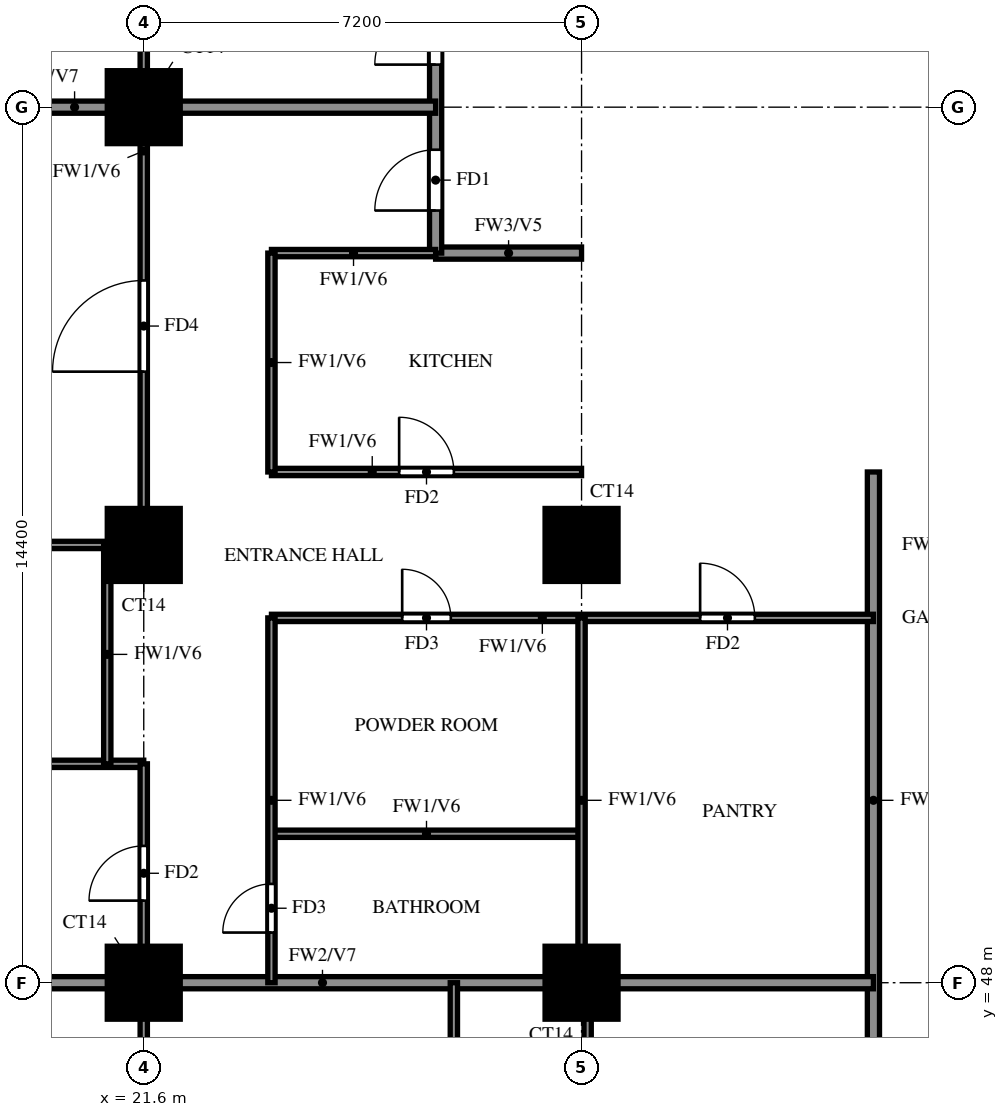
"""IFC4 building model, lengths in metres.
Left out: names, types, materials, properties, quantities, classifications, styles, units other than length and angle.
Written with IfcOpenShell. Run it as: python <this file> out.ifc"""

import sys

from ifc_helpers import new_model, si_unit, direction, frame, frame_2d, origin, origin_2d, place, context, subcontext, project, spatial, rectangle, extrude, source, transform, mapped, element, fill, save


model = new_model("IFC4")
c1 = context("Model", 3, precision=1e-05, world=origin(), true_north=direction((0.0, 1.0)))
c2 = subcontext(c1, "Body", "Model", "MODEL_VIEW")
j1 = project(units=[si_unit("LENGTHUNIT", "METRE"), si_unit("PLANEANGLEUNIT", "RADIAN")], contexts=[c1])
p1 = place(None, origin())
s1 = spatial("IfcSite", under=j1, at=p1, CompositionType="ELEMENT")
p2 = place(p1, origin())
s2 = spatial("IfcBuilding", under=s1, at=p2, CompositionType="ELEMENT")
p3 = place(p2, frame((0.0, 0.0, 104.0)))
s3 = spatial("IfcBuildingStorey", under=s2, at=p3, CompositionType="ELEMENT", Elevation=104.0)
m1 = source(origin(), c2, "Body", "SweptSolid", [
    extrude(rectangle(XDim=1.2, YDim=1.2, at=origin_2d()), origin(), (0.0, 0.0, 1.0), 3.1),
])
for number, where, z_axis, x_axis in (
    (1, (21.6, 48.0, 0.0), (0.0, 0.0, 1.0), (1.0, 0.0, 0.0)),
    (2, (28.8, 48.0, 0.0), (0.0, 0.0, 1.0), (1.0, 0.0, 0.0)),
    (3, (21.6, 55.2, 0.0), (0.0, 0.0, 1.0), (1.0, 0.0, 0.0)),
    (4, (28.8, 55.2, 0.0), (0.0, 0.0, 1.0), (1.0, 0.0, 0.0)),
    (5, (21.6, 62.4, 0.0), (0.0, 0.0, 1.0), (1.0, 0.0, 0.0)),
):
    element("IfcColumn", number, at=place(p3, frame(where, z_axis=z_axis, x_axis=x_axis)), inside=s3, PredefinedType="COLUMN", context=c2, shape_type="MappedRepresentation", body=[
        mapped(m1, transform((0.0, 0.0, 0.0))),
    ])
p4 = place(p3, frame((26.4, 60.0, 0.0), z_axis=(0.0, 0.0, 1.0), x_axis=(1.0, 0.0, 0.0)))
e6 = element("IfcWall", 6, at=p4, inside=s3, PredefinedType="SOLIDWALL", context=c2, shape_type="SweptSolid", body=[
    extrude(rectangle(XDim=2.4, YDim=0.2, at=frame_2d((1.2, 0.0))), origin(), (0.0, 0.0, 1.0), 3.1),
])
p5 = place(p3, frame((26.4, 60.0, 0.0), z_axis=(0.0, 0.0, 1.0), x_axis=(0.0, 1.0, 0.0)))
e7 = element("IfcWall", 7, at=p5, inside=s3, PredefinedType="SOLIDWALL", context=c2, shape_type="SweptSolid", body=[
    extrude(rectangle(XDim=9.6, YDim=0.2, at=frame_2d((4.8, 0.0))), origin(), (0.0, 0.0, 1.0), 3.1),
])
p6 = place(p5, frame((0.7, 0.0, 0.0)))
e8 = element("IfcOpeningElement", 8, at=p6, cuts=e7, PredefinedType="OPENING", context=c2, shape_type="SweptSolid", body=[
    extrude(rectangle(XDim=1.0, YDim=2.1, at=frame_2d((0.5, 1.05))), frame((0.0, 0.11, 0.0), z_axis=(0.0, -1.0, 0.0), x_axis=(1.0, 0.0, 0.0)), (0.0, 0.0, 1.0), 0.22),
])
p7 = place(p5, frame((3.1, 0.0, 0.0)))
e9 = element("IfcOpeningElement", 9, at=p7, cuts=e7, PredefinedType="OPENING", context=c2, shape_type="SweptSolid", body=[
    extrude(rectangle(XDim=1.0, YDim=2.1, at=frame_2d((0.5, 1.05))), frame((0.0, 0.11, 0.0), z_axis=(0.0, -1.0, 0.0), x_axis=(1.0, 0.0, 0.0)), (0.0, 0.0, 1.0), 0.22),
])
p8 = place(p3, frame((33.6, 45.6, 0.0), z_axis=(0.0, 0.0, 1.0), x_axis=(0.0, 1.0, 0.0)))
e10 = element("IfcWall", 10, at=p8, inside=s3, PredefinedType="SOLIDWALL", context=c2, shape_type="SweptSolid", body=[
    extrude(rectangle(XDim=10.8, YDim=0.2, at=frame_2d((5.4, 0.0))), origin(), (0.0, 0.0, 1.0), 3.1),
])
p9 = place(p3, frame((14.525, 48.0, 0.0), z_axis=(0.0, 0.0, 1.0), x_axis=(1.0, 0.0, 0.0)))
e11 = element("IfcWall", 11, at=p9, inside=s3, PredefinedType="SOLIDWALL", context=c2, shape_type="SweptSolid", body=[
    extrude(rectangle(XDim=19.075, YDim=0.2, at=frame_2d((9.538, 0.0))), origin(), (0.0, 0.0, 1.0), 3.1),
])
p10 = place(p3, frame((14.525, 62.4, 0.0), z_axis=(0.0, 0.0, 1.0), x_axis=(1.0, 0.0, 0.0)))
e12 = element("IfcWall", 12, at=p10, inside=s3, PredefinedType="SOLIDWALL", context=c2, shape_type="SweptSolid", body=[
    extrude(rectangle(XDim=11.875, YDim=0.2, at=frame_2d((5.938, 0.0))), origin(), (0.0, 0.0, 1.0), 3.1),
])
p11 = place(p3, frame((23.7, 50.45, 0.0), z_axis=(0.0, 0.0, 1.0), x_axis=(1.0, 0.0, 0.0)))
e13 = element("IfcWall", 13, at=p11, inside=s3, PredefinedType="PARTITIONING", context=c2, shape_type="SweptSolid", body=[
    extrude(rectangle(XDim=5.1, YDim=0.12, at=frame_2d((2.55, 0.0))), origin(), (0.0, 0.0, 1.0), 3.1),
])
p12 = place(p3, frame((14.525, 51.6, 0.0), z_axis=(0.0, 0.0, 1.0), x_axis=(1.0, 0.0, 0.0)))
e14 = element("IfcWall", 14, at=p12, inside=s3, PredefinedType="PARTITIONING", context=c2, shape_type="SweptSolid", body=[
    extrude(rectangle(XDim=7.075, YDim=0.12, at=frame_2d((3.538, 0.0))), origin(), (0.0, 0.0, 1.0), 3.1),
])
p13 = place(p12, frame((2.837, 0.0, 0.0)))
e15 = element("IfcOpeningElement", 15, at=p13, cuts=e14, PredefinedType="OPENING", context=c2, shape_type="SweptSolid", body=[
    extrude(rectangle(XDim=0.8, YDim=2.1, at=frame_2d((0.4, 1.05))), frame((0.0, 0.07, 0.0), z_axis=(0.0, -1.0, 0.0), x_axis=(1.0, 0.0, 0.0)), (0.0, 0.0, 1.0), 0.14),
])
p14 = place(p3, frame((23.7, 54.0, 0.0), z_axis=(0.0, 0.0, 1.0), x_axis=(1.0, 0.0, 0.0)))
e16 = element("IfcWall", 16, at=p14, inside=s3, PredefinedType="PARTITIONING", context=c2, shape_type="SweptSolid", body=[
    extrude(rectangle(XDim=9.9, YDim=0.12, at=frame_2d((4.95, 0.0))), origin(), (0.0, 0.0, 1.0), 3.1),
])
p15 = place(p14, frame((2.15, 0.0, 0.0)))
e17 = element("IfcOpeningElement", 17, at=p15, cuts=e16, PredefinedType="OPENING", context=c2, shape_type="SweptSolid", body=[
    extrude(rectangle(XDim=0.8, YDim=2.1, at=frame_2d((0.4, 1.05))), frame((0.0, 0.07, 0.0), z_axis=(0.0, -1.0, 0.0), x_axis=(1.0, 0.0, 0.0)), (0.0, 0.0, 1.0), 0.14),
])
p16 = place(p14, frame((7.05, 0.0, 0.0)))
e18 = element("IfcOpeningElement", 18, at=p16, cuts=e16, PredefinedType="OPENING", context=c2, shape_type="SweptSolid", body=[
    extrude(rectangle(XDim=0.9, YDim=2.1, at=frame_2d((0.45, 1.05))), frame((0.0, 0.07, 0.0), z_axis=(0.0, -1.0, 0.0), x_axis=(1.0, 0.0, 0.0)), (0.0, 0.0, 1.0), 0.14),
])
p17 = place(p3, frame((14.525, 55.2, 0.0), z_axis=(0.0, 0.0, 1.0), x_axis=(1.0, 0.0, 0.0)))
e19 = element("IfcWall", 19, at=p17, inside=s3, PredefinedType="PARTITIONING", context=c2, shape_type="SweptSolid", body=[
    extrude(rectangle(XDim=7.075, YDim=0.12, at=frame_2d((3.538, 0.0))), origin(), (0.0, 0.0, 1.0), 3.1),
])
p18 = place(p3, frame((23.7, 56.4, 0.0), z_axis=(0.0, 0.0, 1.0), x_axis=(1.0, 0.0, 0.0)))
e20 = element("IfcWall", 20, at=p18, inside=s3, PredefinedType="PARTITIONING", context=c2, shape_type="SweptSolid", body=[
    extrude(rectangle(XDim=5.1, YDim=0.12, at=frame_2d((2.55, 0.0))), origin(), (0.0, 0.0, 1.0), 3.1),
])
p19 = place(p18, frame((2.1, 0.0, 0.0)))
e21 = element("IfcOpeningElement", 21, at=p19, cuts=e20, PredefinedType="OPENING", context=c2, shape_type="SweptSolid", body=[
    extrude(rectangle(XDim=0.9, YDim=2.1, at=frame_2d((0.45, 1.05))), frame((0.0, 0.07, 0.0), z_axis=(0.0, -1.0, 0.0), x_axis=(1.0, 0.0, 0.0)), (0.0, 0.0, 1.0), 0.14),
])
p20 = place(p3, frame((23.7, 60.0, 0.0), z_axis=(0.0, 0.0, 1.0), x_axis=(1.0, 0.0, 0.0)))
e22 = element("IfcWall", 22, at=p20, inside=s3, PredefinedType="PARTITIONING", context=c2, shape_type="SweptSolid", body=[
    extrude(rectangle(XDim=2.7, YDim=0.12, at=frame_2d((1.35, 0.0))), origin(), (0.0, 0.0, 1.0), 3.1),
])
p21 = place(p3, frame((21.0, 51.6, 0.0), z_axis=(0.0, 0.0, 1.0), x_axis=(0.0, 1.0, 0.0)))
e23 = element("IfcWall", 23, at=p21, inside=s3, PredefinedType="PARTITIONING", context=c2, shape_type="SweptSolid", body=[
    extrude(rectangle(XDim=3.6, YDim=0.12, at=frame_2d((1.8, 0.0))), origin(), (0.0, 0.0, 1.0), 3.1),
])
p22 = place(p3, frame((21.6, 33.725, 0.0), z_axis=(0.0, 0.0, 1.0), x_axis=(0.0, 1.0, 0.0)))
e24 = element("IfcWall", 24, at=p22, inside=s3, PredefinedType="PARTITIONING", context=c2, shape_type="SweptSolid", body=[
    extrude(rectangle(XDim=17.875, YDim=0.12, at=frame_2d((8.938, 0.0))), origin(), (0.0, 0.0, 1.0), 3.1),
])
p23 = place(p22, frame((7.775, 0.0, 0.0)))
e25 = element("IfcOpeningElement", 25, at=p23, cuts=e24, PredefinedType="OPENING", context=c2, shape_type="SweptSolid", body=[
    extrude(rectangle(XDim=0.9, YDim=2.1, at=frame_2d((0.45, 1.05))), frame((0.0, 0.07, 0.0), z_axis=(0.0, -1.0, 0.0), x_axis=(1.0, 0.0, 0.0)), (0.0, 0.0, 1.0), 0.14),
])
p24 = place(p22, frame((15.625, 0.0, 0.0)))
e26 = element("IfcOpeningElement", 26, at=p24, cuts=e24, PredefinedType="OPENING", context=c2, shape_type="SweptSolid", body=[
    extrude(rectangle(XDim=0.9, YDim=2.1, at=frame_2d((0.45, 1.05))), frame((0.0, 0.07, 0.0), z_axis=(0.0, -1.0, 0.0), x_axis=(1.0, 0.0, 0.0)), (0.0, 0.0, 1.0), 0.14),
])
p25 = place(p3, frame((21.6, 55.2, 0.0), z_axis=(0.0, 0.0, 1.0), x_axis=(0.0, 1.0, 0.0)))
e27 = element("IfcWall", 27, at=p25, inside=s3, PredefinedType="PARTITIONING", context=c2, shape_type="SweptSolid", body=[
    extrude(rectangle(XDim=14.4, YDim=0.12, at=frame_2d((7.2, 0.0))), origin(), (0.0, 0.0, 1.0), 3.1),
])
p26 = place(p25, frame((2.85, 0.0, 0.0)))
e28 = element("IfcOpeningElement", 28, at=p26, cuts=e27, PredefinedType="OPENING", context=c2, shape_type="SweptSolid", body=[
    extrude(rectangle(XDim=1.5, YDim=2.1, at=frame_2d((0.75, 1.05))), frame((0.0, 0.07, 0.0), z_axis=(0.0, -1.0, 0.0), x_axis=(1.0, 0.0, 0.0)), (0.0, 0.0, 1.0), 0.14),
])
p27 = place(p25, frame((8.55, 0.0, 0.0)))
e29 = element("IfcOpeningElement", 29, at=p27, cuts=e27, PredefinedType="OPENING", context=c2, shape_type="SweptSolid", body=[
    extrude(rectangle(XDim=0.9, YDim=2.1, at=frame_2d((0.45, 1.05))), frame((0.0, 0.07, 0.0), z_axis=(0.0, -1.0, 0.0), x_axis=(1.0, 0.0, 0.0)), (0.0, 0.0, 1.0), 0.14),
])
p28 = place(p25, frame((12.15, 0.0, 0.0)))
e30 = element("IfcOpeningElement", 30, at=p28, cuts=e27, PredefinedType="OPENING", context=c2, shape_type="SweptSolid", body=[
    extrude(rectangle(XDim=0.9, YDim=2.1, at=frame_2d((0.45, 1.05))), frame((0.0, 0.07, 0.0), z_axis=(0.0, -1.0, 0.0), x_axis=(1.0, 0.0, 0.0)), (0.0, 0.0, 1.0), 0.14),
])
p29 = place(p3, frame((23.7, 48.0, 0.0), z_axis=(0.0, 0.0, 1.0), x_axis=(0.0, 1.0, 0.0)))
e31 = element("IfcWall", 31, at=p29, inside=s3, PredefinedType="PARTITIONING", context=c2, shape_type="SweptSolid", body=[
    extrude(rectangle(XDim=6.0, YDim=0.12, at=frame_2d((3.0, 0.0))), origin(), (0.0, 0.0, 1.0), 3.1),
])
p30 = place(p29, frame((0.825, 0.0, 0.0)))
e32 = element("IfcOpeningElement", 32, at=p30, cuts=e31, PredefinedType="OPENING", context=c2, shape_type="SweptSolid", body=[
    extrude(rectangle(XDim=0.8, YDim=2.1, at=frame_2d((0.4, 1.05))), frame((0.0, 0.07, 0.0), z_axis=(0.0, -1.0, 0.0), x_axis=(1.0, 0.0, 0.0)), (0.0, 0.0, 1.0), 0.14),
])
p31 = place(p3, frame((23.7, 56.4, 0.0), z_axis=(0.0, 0.0, 1.0), x_axis=(0.0, 1.0, 0.0)))
e33 = element("IfcWall", 33, at=p31, inside=s3, PredefinedType="PARTITIONING", context=c2, shape_type="SweptSolid", body=[
    extrude(rectangle(XDim=3.6, YDim=0.12, at=frame_2d((1.8, 0.0))), origin(), (0.0, 0.0, 1.0), 3.1),
])
p32 = place(p3, frame((26.7, 42.9, 0.0), z_axis=(0.0, 0.0, 1.0), x_axis=(0.0, 1.0, 0.0)))
e34 = element("IfcWall", 34, at=p32, inside=s3, PredefinedType="PARTITIONING", context=c2, shape_type="SweptSolid", body=[
    extrude(rectangle(XDim=5.1, YDim=0.12, at=frame_2d((2.55, 0.0))), origin(), (0.0, 0.0, 1.0), 3.1),
])
p33 = place(p3, frame((28.8, 48.0, 0.0), z_axis=(0.0, 0.0, 1.0), x_axis=(0.0, 1.0, 0.0)))
e35 = element("IfcWall", 35, at=p33, inside=s3, PredefinedType="PARTITIONING", context=c2, shape_type="SweptSolid", body=[
    extrude(rectangle(XDim=6.0, YDim=0.12, at=frame_2d((3.0, 0.0))), origin(), (0.0, 0.0, 1.0), 3.1),
])
p34 = place(p3, frame((28.9, 42.9, 0.0), z_axis=(0.0, 0.0, 1.0), x_axis=(0.0, 1.0, 0.0)))
e36 = element("IfcWall", 36, at=p34, inside=s3, PredefinedType="PARTITIONING", context=c2, shape_type="SweptSolid", body=[
    extrude(rectangle(XDim=5.1, YDim=0.12, at=frame_2d((2.55, 0.0))), origin(), (0.0, 0.0, 1.0), 3.1),
])
p35 = place(p6, origin())
e37 = element("IfcDoor", 37, at=p35, inside=s3, OperationType="SINGLE_SWING_LEFT", PredefinedType="DOOR", context=c2, shape_type="SweptSolid", body=[
    extrude(rectangle(XDim=1.0, YDim=2.1, at=frame_2d((0.5, 1.05))), frame((0.0, 0.025, 0.0), z_axis=(0.0, -1.0, 0.0), x_axis=(1.0, 0.0, 0.0)), (0.0, 0.0, 1.0), 0.05),
])
fill(e8, e37)
p36 = place(p24, origin())
e38 = element("IfcDoor", 38, at=p36, inside=s3, OperationType="SINGLE_SWING_RIGHT", PredefinedType="DOOR", context=c2, shape_type="SweptSolid", body=[
    extrude(rectangle(XDim=0.9, YDim=2.1, at=frame_2d((0.45, 1.05))), frame((0.0, 0.025, 0.0), z_axis=(0.0, -1.0, 0.0), x_axis=(1.0, 0.0, 0.0)), (0.0, 0.0, 1.0), 0.05),
])
fill(e26, e38)
p37 = place(p26, origin())
e39 = element("IfcDoor", 39, at=p37, inside=s3, OperationType="SINGLE_SWING_LEFT", PredefinedType="DOOR", context=c2, shape_type="SweptSolid", body=[
    extrude(rectangle(XDim=1.5, YDim=2.1, at=frame_2d((0.75, 1.05))), frame((0.0, 0.025, 0.0), z_axis=(0.0, -1.0, 0.0), x_axis=(1.0, 0.0, 0.0)), (0.0, 0.0, 1.0), 0.05),
])
fill(e28, e39)
p38 = place(p30, origin())
e40 = element("IfcDoor", 40, at=p38, inside=s3, OperationType="SINGLE_SWING_RIGHT", PredefinedType="DOOR", context=c2, shape_type="SweptSolid", body=[
    extrude(rectangle(XDim=0.8, YDim=2.1, at=frame_2d((0.4, 1.05))), frame((0.0, 0.025, 0.0), z_axis=(0.0, -1.0, 0.0), x_axis=(1.0, 0.0, 0.0)), (0.0, 0.0, 1.0), 0.05),
])
fill(e32, e40)
p39 = place(p15, origin())
e41 = element("IfcDoor", 41, at=p39, inside=s3, OperationType="SINGLE_SWING_LEFT", PredefinedType="DOOR", context=c2, shape_type="SweptSolid", body=[
    extrude(rectangle(XDim=0.8, YDim=2.1, at=frame_2d((0.4, 1.05))), frame((0.0, 0.025, 0.0), z_axis=(0.0, -1.0, 0.0), x_axis=(1.0, 0.0, 0.0)), (0.0, 0.0, 1.0), 0.05),
])
fill(e17, e41)
p40 = place(p19, origin())
e42 = element("IfcDoor", 42, at=p40, inside=s3, OperationType="SINGLE_SWING_LEFT", PredefinedType="DOOR", context=c2, shape_type="SweptSolid", body=[
    extrude(rectangle(XDim=0.9, YDim=2.1, at=frame_2d((0.45, 1.05))), frame((0.0, 0.025, 0.0), z_axis=(0.0, -1.0, 0.0), x_axis=(1.0, 0.0, 0.0)), (0.0, 0.0, 1.0), 0.05),
])
fill(e21, e42)
p41 = place(p16, origin())
e43 = element("IfcDoor", 43, at=p41, inside=s3, OperationType="SINGLE_SWING_RIGHT", PredefinedType="DOOR", context=c2, shape_type="SweptSolid", body=[
    extrude(rectangle(XDim=0.9, YDim=2.1, at=frame_2d((0.45, 1.05))), frame((0.0, 0.025, 0.0), z_axis=(0.0, -1.0, 0.0), x_axis=(1.0, 0.0, 0.0)), (0.0, 0.0, 1.0), 0.05),
])
fill(e18, e43)
p42 = place(p7, origin())
e44 = element("IfcDoor", 44, at=p42, inside=s3, OperationType="SINGLE_SWING_RIGHT", PredefinedType="DOOR", context=c2, shape_type="SweptSolid", body=[
    extrude(rectangle(XDim=1.0, YDim=2.1, at=frame_2d((0.5, 1.05))), frame((0.0, 0.025, 0.0), z_axis=(0.0, -1.0, 0.0), x_axis=(1.0, 0.0, 0.0)), (0.0, 0.0, 1.0), 0.05),
])
fill(e9, e44)
save(model, sys.argv[1])
